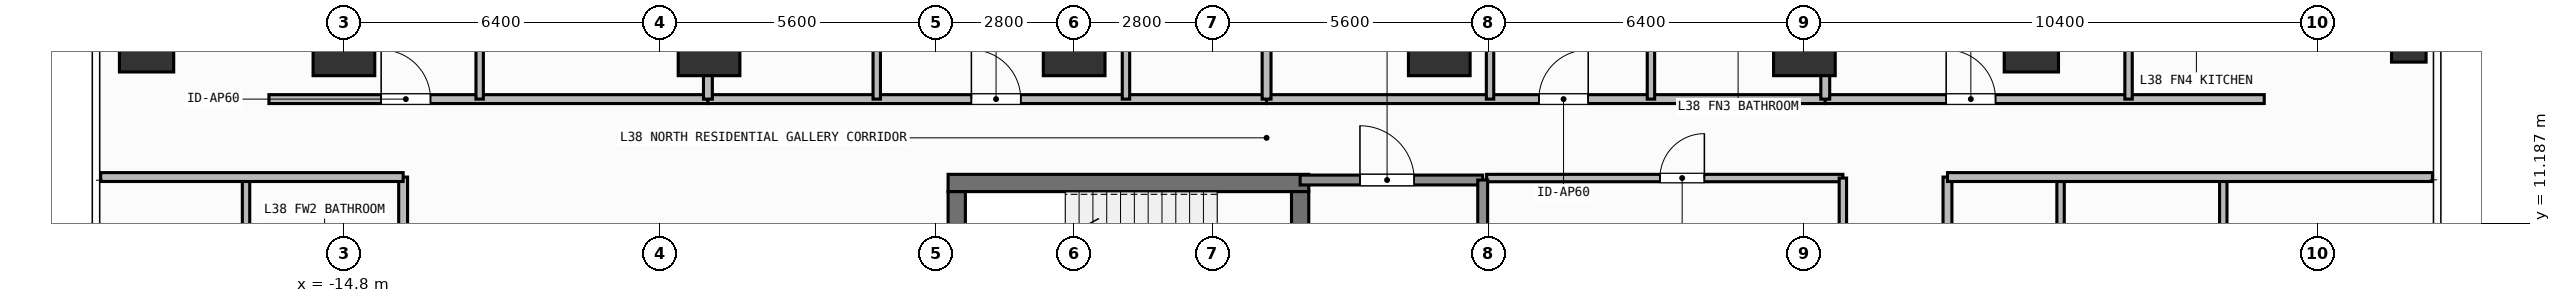
"""IFC4 building model, lengths in metres.
Left out: names, types, materials, properties, quantities, classifications, styles, units other than length and angle.
Written with IfcOpenShell. Run it as: python <this file> out.ifc"""

import sys

from ifc_helpers import new_model, si_unit, direction, frame, frame_2d, origin, origin_2d, place, context, subcontext, project, spatial, rectangle, hollow_rectangle, extrude, element, fill, save


model = new_model("IFC4")
c1 = context("Model", 3, precision=1e-05, world=origin(), true_north=direction((0.0, 1.0)))
c2 = subcontext(c1, "Body", "Model", "MODEL_VIEW")
j1 = project(units=[si_unit("LENGTHUNIT", "METRE"), si_unit("PLANEANGLEUNIT", "RADIAN")], contexts=[c1])
p1 = place(None, origin())
s1 = spatial("IfcSite", under=j1, at=p1, CompositionType="ELEMENT")
p2 = place(p1, origin())
s2 = spatial("IfcBuilding", under=s1, at=p2, CompositionType="ELEMENT")
p3 = place(p2, frame((0.0, 0.0, 152.4)))
s3 = spatial("IfcBuildingStorey", under=s2, at=p3, CompositionType="ELEMENT", Elevation=152.4)
p4 = place(p3, frame((-2.555, 12.0, 0.0), z_axis=(0.0, 0.0, 1.0), x_axis=(1.0, 0.0, 0.0)))
e1 = element("IfcWall", 1, at=p4, inside=s3, PredefinedType="SHEAR", context=c2, shape_type="SweptSolid", body=[
    extrude(rectangle(XDim=7.31, YDim=0.35, at=frame_2d((3.655, 0.0))), origin(), (0.0, 0.0, 1.0), 3.9),
])
p5 = place(p3, frame((-2.38, 8.9, 0.0), z_axis=(0.0, 0.0, 1.0), x_axis=(0.0, 1.0, 0.0)))
e2 = element("IfcWall", 2, at=p5, inside=s3, PredefinedType="SHEAR", context=c2, shape_type="SweptSolid", body=[
    extrude(rectangle(XDim=2.925, YDim=0.35, at=frame_2d((1.462, 0.0))), origin(), (0.0, 0.0, 1.0), 3.9),
])
p6 = place(p3, frame((4.58, 11.825, 0.0), z_axis=(0.0, 0.0, 1.0), x_axis=(0.0, -1.0, 0.0)))
e3 = element("IfcWall", 3, at=p6, inside=s3, PredefinedType="SHEAR", context=c2, shape_type="SweptSolid", body=[
    extrude(rectangle(XDim=2.925, YDim=0.35, at=frame_2d((1.462, 0.0))), origin(), (0.0, 0.0, 1.0), 3.9),
])
p7 = place(p6, frame((0.913, 0.0, 0.0)))
e4 = element("IfcOpeningElement", 4, at=p7, cuts=e3, PredefinedType="OPENING", context=c2, shape_type="SweptSolid", body=[
    extrude(rectangle(XDim=1.1, YDim=2.15, at=frame_2d((0.55, 1.075))), frame((0.0, 0.185, 0.0), z_axis=(0.0, -1.0, 0.0), x_axis=(1.0, 0.0, 0.0)), (0.0, 0.0, 1.0), 0.37),
])
for number, where, z_axis, x_axis in (
    (5, (-14.8, 14.8, 0.0), (0.0, 0.0, 1.0), (1.0, 0.0, 0.0)),
    (6, (-7.4, 14.8, 0.0), (0.0, 0.0, 1.0), (1.0, 0.0, 0.0)),
    (7, (0.0, 14.8, 0.0), (0.0, 0.0, 1.0), (1.0, 0.0, 0.0)),
    (8, (7.4, 14.8, 0.0), (0.0, 0.0, 1.0), (1.0, 0.0, 0.0)),
    (9, (14.8, 14.8, 0.0), (0.0, 0.0, 1.0), (1.0, 0.0, 0.0)),
):
    element("IfcColumn", number, at=place(p3, frame(where, z_axis=z_axis, x_axis=x_axis)), inside=s3, PredefinedType="COLUMN", context=c2, shape_type="SweptSolid", body=[
        extrude(rectangle(XDim=1.25, YDim=1.25, at=origin_2d()), origin(), (0.0, 0.0, 1.0), 3.9),
    ])
for number, where, z_axis, x_axis in (
    (10, (-18.8, 14.8, 0.0), (0.0, 0.0, 1.0), (1.0, 0.0, 0.0)),
    (11, (19.4, 14.8, 0.0), (0.0, 0.0, 1.0), (1.0, 0.0, 0.0)),
):
    element("IfcColumn", number, at=place(p3, frame(where, z_axis=z_axis, x_axis=x_axis)), inside=s3, PredefinedType="COLUMN", context=c2, shape_type="SweptSolid", body=[
        extrude(rectangle(XDim=1.1, YDim=1.1, at=origin_2d()), origin(), (0.0, 0.0, 1.0), 3.9),
    ])
p8 = place(p3, frame((27.05, 14.8, 0.0), z_axis=(0.0, 0.0, 1.0), x_axis=(1.0, 0.0, 0.0)))
e12 = element("IfcColumn", 12, at=p8, inside=s3, PredefinedType="COLUMN", context=c2, shape_type="SweptSolid", body=[
    extrude(hollow_rectangle(XDim=0.7, YDim=0.7, WallThickness=0.032, at=origin_2d()), origin(), (0.0, 0.0, 1.0), 3.9),
])
p9 = place(p3, frame((4.58, 12.06, 0.0), z_axis=(0.0, 0.0, 1.0), x_axis=(1.0, 0.0, 0.0)))
e13 = element("IfcWall", 13, at=p9, inside=s3, PredefinedType="SOLIDWALL", context=c2, shape_type="SweptSolid", body=[
    extrude(rectangle(XDim=3.7, YDim=0.2, at=frame_2d((1.85, 0.0))), origin(), (0.0, 0.0, 1.0), 3.6),
])
p10 = place(p9, frame((1.212, 0.0, 0.0)))
e14 = element("IfcOpeningElement", 14, at=p10, cuts=e13, PredefinedType="OPENING", context=c2, shape_type="SweptSolid", body=[
    extrude(rectangle(XDim=1.1, YDim=2.15, at=frame_2d((0.55, 1.075))), frame((0.0, 0.11, 0.0), z_axis=(0.0, -1.0, 0.0), x_axis=(1.0, 0.0, 0.0)), (0.0, 0.0, 1.0), 0.22),
])
p11 = place(p3, frame((8.36, 12.1, 0.0), z_axis=(0.0, 0.0, 1.0), x_axis=(1.0, 0.0, 0.0)))
e15 = element("IfcWall", 15, at=p11, inside=s3, PredefinedType="PARTITIONING", context=c2, shape_type="SweptSolid", body=[
    extrude(rectangle(XDim=7.22, YDim=0.15, at=frame_2d((3.61, 0.0))), origin(), (0.0, 0.0, 1.0), 3.6),
])
p12 = place(p11, frame((3.513, 0.0, 0.0)))
e16 = element("IfcOpeningElement", 16, at=p12, cuts=e15, PredefinedType="OPENING", context=c2, shape_type="SweptSolid", body=[
    extrude(rectangle(XDim=0.9, YDim=2.1, at=frame_2d((0.45, 1.05))), frame((0.0, 0.085, 0.0), z_axis=(0.0, -1.0, 0.0), x_axis=(1.0, 0.0, 0.0)), (0.0, 0.0, 1.0), 0.17),
])
p13 = place(p3, frame((-16.32, 13.7, 0.0), z_axis=(0.0, 0.0, 1.0), x_axis=(1.0, 0.0, 0.0)))
e17 = element("IfcWall", 17, at=p13, inside=s3, PredefinedType="PARTITIONING", context=c2, shape_type="SweptSolid", body=[
    extrude(rectangle(XDim=8.897, YDim=0.18, at=frame_2d((4.448, 0.0))), origin(), (0.0, 0.0, 1.0), 3.6),
])
p14 = place(p13, frame((2.274, 0.0, 0.0)))
e18 = element("IfcOpeningElement", 18, at=p14, cuts=e17, PredefinedType="OPENING", context=c2, shape_type="SweptSolid", body=[
    extrude(rectangle(XDim=1.0, YDim=2.2, at=frame_2d((0.5, 1.1))), frame((0.0, 0.1, 0.0), z_axis=(0.0, -1.0, 0.0), x_axis=(1.0, 0.0, 0.0)), (0.0, 0.0, 1.0), 0.2),
])
p15 = place(p3, frame((-12.049, 13.7, 0.0), z_axis=(0.0, 0.0, 1.0), x_axis=(0.0, 1.0, 0.0)))
e19 = element("IfcWall", 19, at=p15, inside=s3, PredefinedType="PARTITIONING", context=c2, shape_type="SweptSolid", body=[
    extrude(rectangle(XDim=3.138, YDim=0.15, at=frame_2d((1.569, 0.0))), origin(), (0.0, 0.0, 1.0), 3.6),
])
p16 = place(p15, frame((1.233, 0.0, 0.0)))
e20 = element("IfcOpeningElement", 20, at=p16, cuts=e19, PredefinedType="OPENING", context=c2, shape_type="SweptSolid", body=[
    extrude(rectangle(XDim=0.85, YDim=2.1, at=frame_2d((0.425, 1.05))), frame((0.0, 0.085, 0.0), z_axis=(0.0, -1.0, 0.0), x_axis=(1.0, 0.0, 0.0)), (0.0, 0.0, 1.0), 0.17),
])
p17 = place(p3, frame((-7.423, 13.7, 0.0), z_axis=(0.0, 0.0, 1.0), x_axis=(1.0, 0.0, 0.0)))
e21 = element("IfcWall", 21, at=p17, inside=s3, PredefinedType="PARTITIONING", context=c2, shape_type="SweptSolid", body=[
    extrude(rectangle(XDim=11.323, YDim=0.18, at=frame_2d((5.662, 0.0))), origin(), (0.0, 0.0, 1.0), 3.6),
])
p18 = place(p17, frame((5.34, 0.0, 0.0)))
e22 = element("IfcOpeningElement", 22, at=p18, cuts=e21, PredefinedType="OPENING", context=c2, shape_type="SweptSolid", body=[
    extrude(rectangle(XDim=1.0, YDim=2.2, at=frame_2d((0.5, 1.1))), frame((0.0, 0.1, 0.0), z_axis=(0.0, -1.0, 0.0), x_axis=(1.0, 0.0, 0.0)), (0.0, 0.0, 1.0), 0.2),
])
p19 = place(p3, frame((-4.001, 13.7, 0.0), z_axis=(0.0, 0.0, 1.0), x_axis=(0.0, 1.0, 0.0)))
e23 = element("IfcWall", 23, at=p19, inside=s3, PredefinedType="PARTITIONING", context=c2, shape_type="SweptSolid", body=[
    extrude(rectangle(XDim=5.845, YDim=0.15, at=frame_2d((2.922, 0.0))), origin(), (0.0, 0.0, 1.0), 3.6),
])
p20 = place(p19, frame((2.498, 0.0, 0.0)))
e24 = element("IfcOpeningElement", 24, at=p20, cuts=e23, PredefinedType="OPENING", context=c2, shape_type="SweptSolid", body=[
    extrude(rectangle(XDim=0.85, YDim=2.1, at=frame_2d((0.425, 1.05))), frame((0.0, 0.085, 0.0), z_axis=(0.0, -1.0, 0.0), x_axis=(1.0, 0.0, 0.0)), (0.0, 0.0, 1.0), 0.17),
])
p21 = place(p3, frame((1.05, 13.7, 0.0), z_axis=(0.0, 0.0, 1.0), x_axis=(0.0, 1.0, 0.0)))
e25 = element("IfcWall", 25, at=p21, inside=s3, PredefinedType="PARTITIONING", context=c2, shape_type="SweptSolid", body=[
    extrude(rectangle(XDim=5.845, YDim=0.15, at=frame_2d((2.922, 0.0))), origin(), (0.0, 0.0, 1.0), 3.6),
])
p22 = place(p21, frame((2.498, 0.0, 0.0)))
e26 = element("IfcOpeningElement", 26, at=p22, cuts=e25, PredefinedType="OPENING", context=c2, shape_type="SweptSolid", body=[
    extrude(rectangle(XDim=0.85, YDim=2.1, at=frame_2d((0.425, 1.05))), frame((0.0, 0.085, 0.0), z_axis=(0.0, -1.0, 0.0), x_axis=(1.0, 0.0, 0.0)), (0.0, 0.0, 1.0), 0.17),
])
p23 = place(p3, frame((3.9, 13.7, 0.0), z_axis=(0.0, 0.0, 1.0), x_axis=(1.0, 0.0, 0.0)))
e27 = element("IfcWall", 27, at=p23, inside=s3, PredefinedType="PARTITIONING", context=c2, shape_type="SweptSolid", body=[
    extrude(rectangle(XDim=11.323, YDim=0.18, at=frame_2d((5.662, 0.0))), origin(), (0.0, 0.0, 1.0), 3.6),
])
p24 = place(p23, frame((5.519, 0.0, 0.0)))
e28 = element("IfcOpeningElement", 28, at=p24, cuts=e27, PredefinedType="OPENING", context=c2, shape_type="SweptSolid", body=[
    extrude(rectangle(XDim=1.0, YDim=2.2, at=frame_2d((0.5, 1.1))), frame((0.0, 0.1, 0.0), z_axis=(0.0, -1.0, 0.0), x_axis=(1.0, 0.0, 0.0)), (0.0, 0.0, 1.0), 0.2),
])
p25 = place(p3, frame((8.429, 13.7, 0.0), z_axis=(0.0, 0.0, 1.0), x_axis=(0.0, 1.0, 0.0)))
e29 = element("IfcWall", 29, at=p25, inside=s3, PredefinedType="PARTITIONING", context=c2, shape_type="SweptSolid", body=[
    extrude(rectangle(XDim=5.69, YDim=0.15, at=frame_2d((2.845, 0.0))), origin(), (0.0, 0.0, 1.0), 3.6),
])
p26 = place(p25, frame((2.42, 0.0, 0.0)))
e30 = element("IfcOpeningElement", 30, at=p26, cuts=e29, PredefinedType="OPENING", context=c2, shape_type="SweptSolid", body=[
    extrude(rectangle(XDim=0.85, YDim=2.1, at=frame_2d((0.425, 1.05))), frame((0.0, 0.085, 0.0), z_axis=(0.0, -1.0, 0.0), x_axis=(1.0, 0.0, 0.0)), (0.0, 0.0, 1.0), 0.17),
])
p27 = place(p3, frame((11.69, 13.7, 0.0), z_axis=(0.0, 0.0, 1.0), x_axis=(0.0, 1.0, 0.0)))
e31 = element("IfcWall", 31, at=p27, inside=s3, PredefinedType="PARTITIONING", context=c2, shape_type="SweptSolid", body=[
    extrude(rectangle(XDim=5.69, YDim=0.15, at=frame_2d((2.845, 0.0))), origin(), (0.0, 0.0, 1.0), 3.6),
])
p28 = place(p27, frame((2.42, 0.0, 0.0)))
e32 = element("IfcOpeningElement", 32, at=p28, cuts=e31, PredefinedType="OPENING", context=c2, shape_type="SweptSolid", body=[
    extrude(rectangle(XDim=0.85, YDim=2.1, at=frame_2d((0.425, 1.05))), frame((0.0, 0.085, 0.0), z_axis=(0.0, -1.0, 0.0), x_axis=(1.0, 0.0, 0.0)), (0.0, 0.0, 1.0), 0.17),
])
p29 = place(p3, frame((15.223, 13.7, 0.0), z_axis=(0.0, 0.0, 1.0), x_axis=(1.0, 0.0, 0.0)))
e33 = element("IfcWall", 33, at=p29, inside=s3, PredefinedType="PARTITIONING", context=c2, shape_type="SweptSolid", body=[
    extrude(rectangle(XDim=8.897, YDim=0.18, at=frame_2d((4.449, 0.0))), origin(), (0.0, 0.0, 1.0), 3.6),
])
p30 = place(p29, frame((2.451, 0.0, 0.0)))
e34 = element("IfcOpeningElement", 34, at=p30, cuts=e33, PredefinedType="OPENING", context=c2, shape_type="SweptSolid", body=[
    extrude(rectangle(XDim=1.0, YDim=2.2, at=frame_2d((0.5, 1.1))), frame((0.0, 0.1, 0.0), z_axis=(0.0, -1.0, 0.0), x_axis=(1.0, 0.0, 0.0)), (0.0, 0.0, 1.0), 0.2),
])
p31 = place(p3, frame((21.37, 13.7, 0.0), z_axis=(0.0, 0.0, 1.0), x_axis=(0.0, 1.0, 0.0)))
e35 = element("IfcWall", 35, at=p31, inside=s3, PredefinedType="PARTITIONING", context=c2, shape_type="SweptSolid", body=[
    extrude(rectangle(XDim=3.129, YDim=0.15, at=frame_2d((1.564, 0.0))), origin(), (0.0, 0.0, 1.0), 3.6),
])
p32 = place(p31, frame((1.763, 0.0, 0.0)))
e36 = element("IfcOpeningElement", 36, at=p32, cuts=e35, PredefinedType="OPENING", context=c2, shape_type="SweptSolid", body=[
    extrude(rectangle(XDim=0.85, YDim=2.1, at=frame_2d((0.425, 1.05))), frame((0.0, 0.085, 0.0), z_axis=(0.0, -1.0, 0.0), x_axis=(1.0, 0.0, 0.0)), (0.0, 0.0, 1.0), 0.17),
])
p33 = place(p3, frame((-13.6, -1.164, 0.0), z_axis=(0.0, 0.0, 1.0), x_axis=(0.0, 1.0, 0.0)))
e37 = element("IfcWall", 37, at=p33, inside=s3, PredefinedType="PARTITIONING", context=c2, shape_type="SweptSolid", body=[
    extrude(rectangle(XDim=13.284, YDim=0.18, at=frame_2d((6.642, 0.0))), origin(), (0.0, 0.0, 1.0), 3.6),
])
p34 = place(p33, frame((6.231, 0.0, 0.0)))
e38 = element("IfcOpeningElement", 38, at=p34, cuts=e37, PredefinedType="OPENING", context=c2, shape_type="SweptSolid", body=[
    extrude(rectangle(XDim=1.0, YDim=2.2, at=frame_2d((0.5, 1.1))), frame((0.0, 0.1, 0.0), z_axis=(0.0, -1.0, 0.0), x_axis=(1.0, 0.0, 0.0)), (0.0, 0.0, 1.0), 0.2),
])
p35 = place(p3, frame((17.7, -12.12, 0.0), z_axis=(0.0, 0.0, 1.0), x_axis=(0.0, 1.0, 0.0)))
e39 = element("IfcWall", 39, at=p35, inside=s3, PredefinedType="PARTITIONING", context=c2, shape_type="SweptSolid", body=[
    extrude(rectangle(XDim=24.24, YDim=0.18, at=frame_2d((12.12, 0.0))), origin(), (0.0, 0.0, 1.0), 3.6),
])
p36 = place(p35, frame((11.62, 0.0, 0.0)))
e40 = element("IfcOpeningElement", 40, at=p36, cuts=e39, PredefinedType="OPENING", context=c2, shape_type="SweptSolid", body=[
    extrude(rectangle(XDim=1.0, YDim=2.2, at=frame_2d((0.5, 1.1))), frame((0.0, 0.1, 0.0), z_axis=(0.0, -1.0, 0.0), x_axis=(1.0, 0.0, 0.0)), (0.0, 0.0, 1.0), 0.2),
])
p37 = place(p3, frame((8.28, 8.875, 0.0), z_axis=(0.0, 0.0, 1.0), x_axis=(0.0, 1.0, 0.0)))
e41 = element("IfcWall", 41, at=p37, inside=s3, PredefinedType="SOLIDWALL", context=c2, shape_type="SweptSolid", body=[
    extrude(rectangle(XDim=3.185, YDim=0.2, at=frame_2d((1.593, 0.0))), origin(), (0.0, 0.0, 1.0), 3.6),
])
p38 = place(p3, frame((15.58, 5.85, 0.0), z_axis=(0.0, 0.0, 1.0), x_axis=(0.0, 1.0, 0.0)))
e42 = element("IfcWall", 42, at=p38, inside=s3, PredefinedType="PARTITIONING", context=c2, shape_type="SweptSolid", body=[
    extrude(rectangle(XDim=6.25, YDim=0.15, at=frame_2d((3.125, 0.0))), origin(), (0.0, 0.0, 1.0), 3.6),
])
p39 = place(p3, frame((-7.423, 13.7, 0.0), z_axis=(0.0, 0.0, 1.0), x_axis=(0.0, 1.0, 0.0)))
e43 = element("IfcWall", 43, at=p39, inside=s3, PredefinedType="PARTITIONING", context=c2, shape_type="SweptSolid", body=[
    extrude(rectangle(XDim=9.93, YDim=0.18, at=frame_2d((4.965, 0.0))), origin(), (0.0, 0.0, 1.0), 3.002),
])
for number, where, z_axis, x_axis in (
    (44, (3.9, 13.7, 0.0), (0.0, 0.0, 1.0), (0.0, 1.0, 0.0)),
    (45, (15.223, 13.7, 0.0), (0.0, 0.0, 1.0), (0.0, 1.0, 0.0)),
):
    element("IfcWall", number, at=place(p3, frame(where, z_axis=z_axis, x_axis=x_axis)), inside=s3, PredefinedType="PARTITIONING", context=c2, shape_type="SweptSolid", body=[
        extrude(rectangle(XDim=9.93, YDim=0.18, at=frame_2d((4.965, 0.0))), origin(), (0.0, 0.0, 1.0), 3.6),
    ])
p40 = place(p3, frame((-16.784, 8.394, 0.0), z_axis=(0.0, 0.0, 1.0), x_axis=(0.0, 1.0, 0.0)))
e46 = element("IfcWall", 46, at=p40, inside=s3, PredefinedType="PARTITIONING", context=c2, shape_type="SweptSolid", body=[
    extrude(rectangle(XDim=3.726, YDim=0.15, at=frame_2d((1.863, 0.0))), origin(), (0.0, 0.0, 1.0), 3.6),
])
p41 = place(p3, frame((-19.73, 12.12, 0.0), z_axis=(0.0, 0.0, 1.0), x_axis=(1.0, 0.0, 0.0)))
e47 = element("IfcWall", 47, at=p41, inside=s3, PredefinedType="PARTITIONING", context=c2, shape_type="SweptSolid", body=[
    extrude(rectangle(XDim=6.13, YDim=0.18, at=frame_2d((3.065, 0.0))), origin(), (0.0, 0.0, 1.0), 3.6),
])
for number, where, z_axis, x_axis in (
    (48, (19.992, 5.436, 0.0), (0.0, 0.0, 1.0), (0.0, 1.0, 0.0)),
    (49, (23.29, 5.436, 0.0), (0.0, 0.0, 1.0), (0.0, 1.0, 0.0)),
):
    element("IfcWall", number, at=place(p3, frame(where, z_axis=z_axis, x_axis=x_axis)), inside=s3, PredefinedType="PARTITIONING", context=c2, shape_type="SweptSolid", body=[
        extrude(rectangle(XDim=6.684, YDim=0.15, at=frame_2d((3.342, 0.0))), origin(), (0.0, 0.0, 1.0), 3.6),
    ])
p42 = place(p3, frame((17.7, 12.12, 0.0), z_axis=(0.0, 0.0, 1.0), x_axis=(1.0, 0.0, 0.0)))
e50 = element("IfcWall", 50, at=p42, inside=s3, PredefinedType="PARTITIONING", context=c2, shape_type="SweptSolid", body=[
    extrude(rectangle(XDim=9.83, YDim=0.18, at=frame_2d((4.915, 0.0))), origin(), (0.0, 0.0, 1.0), 3.6),
])
p43 = place(p10, origin())
e51 = element("IfcDoor", 51, at=p43, inside=s3, OperationType="SINGLE_SWING_LEFT", PredefinedType="DOOR", context=c2, shape_type="SweptSolid", body=[
    extrude(rectangle(XDim=1.1, YDim=2.15, at=frame_2d((0.55, 1.075))), frame((0.0, 0.025, 0.0), z_axis=(0.0, -1.0, 0.0), x_axis=(1.0, 0.0, 0.0)), (0.0, 0.0, 1.0), 0.05),
])
fill(e14, e51)
p44 = place(p12, origin())
e52 = element("IfcDoor", 52, at=p44, inside=s3, OperationType="SINGLE_SWING_RIGHT", PredefinedType="DOOR", context=c2, shape_type="SweptSolid", body=[
    extrude(rectangle(XDim=0.9, YDim=2.1, at=frame_2d((0.45, 1.05))), frame((0.0, 0.025, 0.0), z_axis=(0.0, -1.0, 0.0), x_axis=(1.0, 0.0, 0.0)), (0.0, 0.0, 1.0), 0.05),
])
fill(e16, e52)
p45 = place(p14, origin())
e53 = element("IfcDoor", 53, at=p45, inside=s3, OperationType="SINGLE_SWING_LEFT", PredefinedType="DOOR", context=c2, shape_type="SweptSolid", body=[
    extrude(rectangle(XDim=1.0, YDim=2.2, at=frame_2d((0.5, 1.1))), frame((0.0, 0.025, 0.0), z_axis=(0.0, -1.0, 0.0), x_axis=(1.0, 0.0, 0.0)), (0.0, 0.0, 1.0), 0.05),
])
fill(e18, e53)
p46 = place(p18, origin())
e54 = element("IfcDoor", 54, at=p46, inside=s3, OperationType="SINGLE_SWING_LEFT", PredefinedType="DOOR", context=c2, shape_type="SweptSolid", body=[
    extrude(rectangle(XDim=1.0, YDim=2.2, at=frame_2d((0.5, 1.1))), frame((0.0, 0.025, 0.0), z_axis=(0.0, -1.0, 0.0), x_axis=(1.0, 0.0, 0.0)), (0.0, 0.0, 1.0), 0.05),
])
fill(e22, e54)
p47 = place(p24, origin())
e55 = element("IfcDoor", 55, at=p47, inside=s3, OperationType="SINGLE_SWING_RIGHT", PredefinedType="DOOR", context=c2, shape_type="SweptSolid", body=[
    extrude(rectangle(XDim=1.0, YDim=2.2, at=frame_2d((0.5, 1.1))), frame((0.0, 0.025, 0.0), z_axis=(0.0, -1.0, 0.0), x_axis=(1.0, 0.0, 0.0)), (0.0, 0.0, 1.0), 0.05),
])
fill(e28, e55)
p48 = place(p30, origin())
e56 = element("IfcDoor", 56, at=p48, inside=s3, OperationType="SINGLE_SWING_LEFT", PredefinedType="DOOR", context=c2, shape_type="SweptSolid", body=[
    extrude(rectangle(XDim=1.0, YDim=2.2, at=frame_2d((0.5, 1.1))), frame((0.0, 0.025, 0.0), z_axis=(0.0, -1.0, 0.0), x_axis=(1.0, 0.0, 0.0)), (0.0, 0.0, 1.0), 0.05),
])
fill(e34, e56)
save(model, sys.argv[1])
